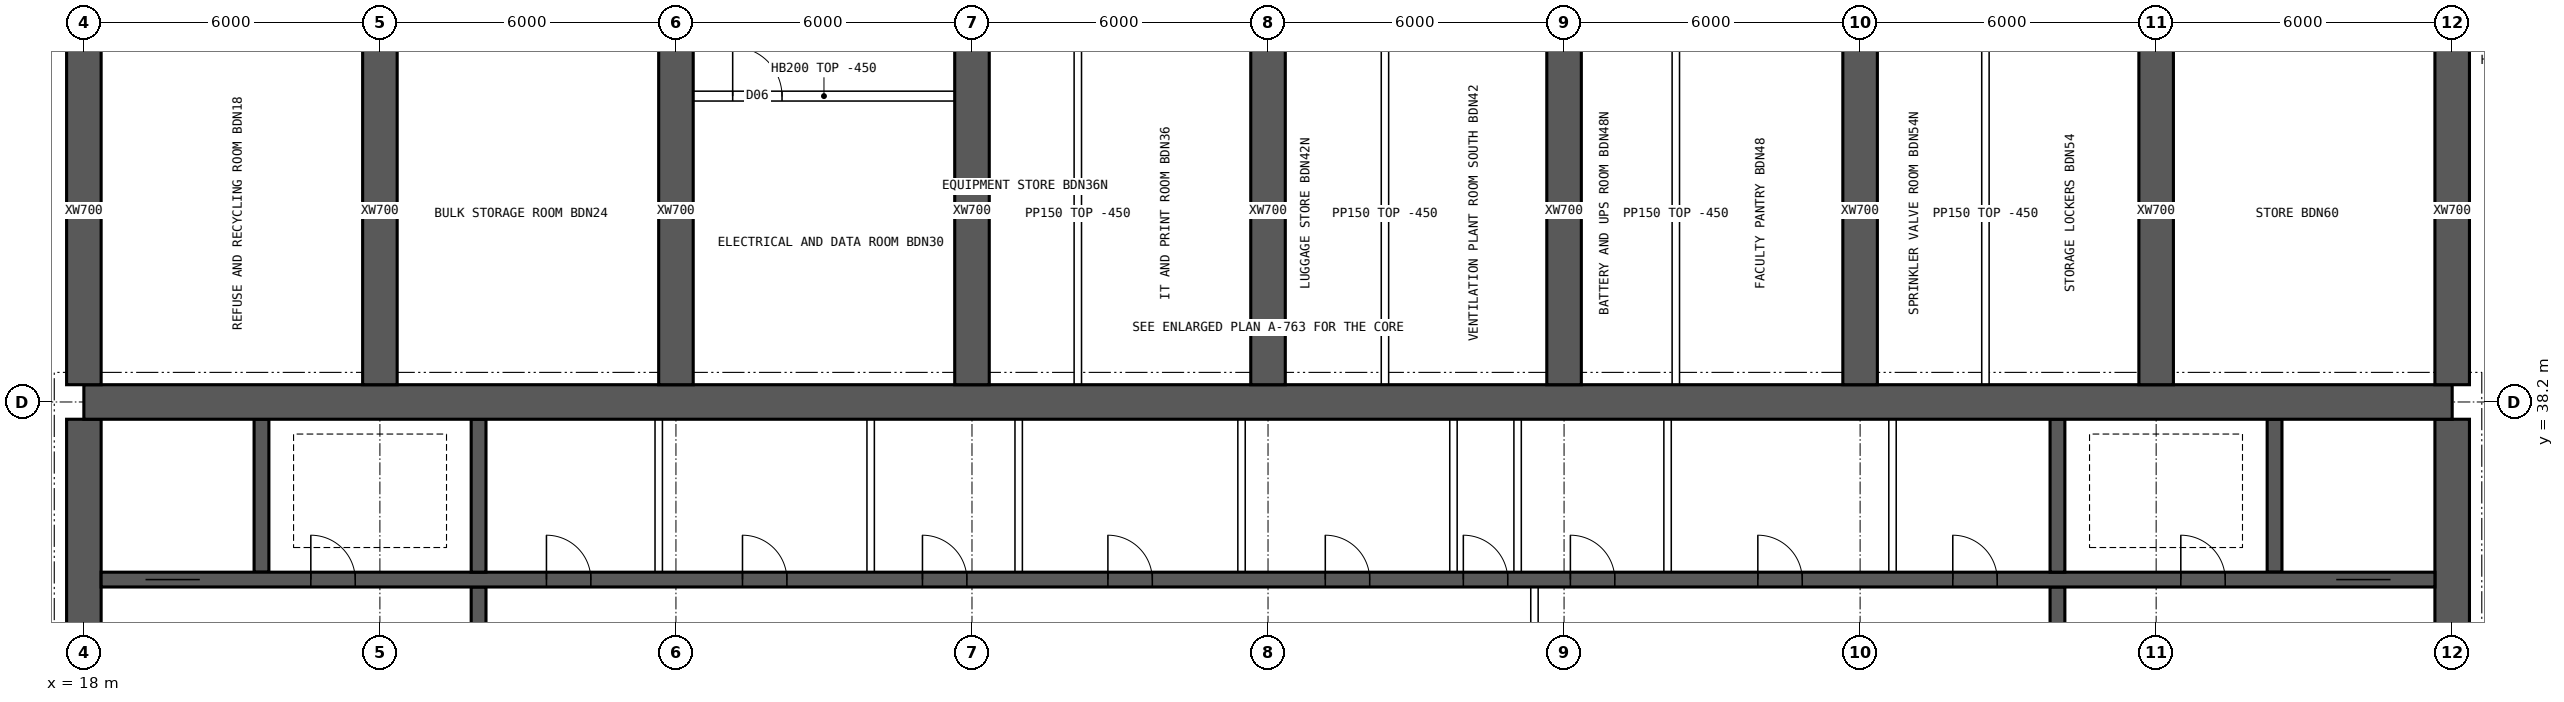
"""IFC4 building model, lengths in metres.
Left out: names, types, materials, properties, quantities, classifications, styles, units other than length and angle.
Written with IfcOpenShell. Run it as: python <this file> out.ifc"""

import sys

from ifc_helpers import new_model, si_unit, direction, frame, frame_2d, origin, place, context, subcontext, project, spatial, rectangle, extrude, element, fill, save


model = new_model("IFC4")
c1 = context("Model", 3, precision=1e-05, world=origin(), true_north=direction((0.0, 1.0)))
c2 = subcontext(c1, "Body", "Model", "MODEL_VIEW")
j1 = project(units=[si_unit("LENGTHUNIT", "METRE"), si_unit("PLANEANGLEUNIT", "RADIAN")], contexts=[c1])
p1 = place(None, origin())
s1 = spatial("IfcSite", under=j1, at=p1, CompositionType="ELEMENT")
p2 = place(p1, origin())
s2 = spatial("IfcBuilding", under=s1, at=p2, CompositionType="ELEMENT")
p3 = place(p2, frame((0.0, 0.0, 242.8)))
s3 = spatial("IfcBuildingStorey", under=s2, at=p3, CompositionType="ELEMENT", Elevation=242.8)
p4 = place(p3, frame((18.0, 38.2, 0.0), z_axis=(0.0, 0.0, 1.0), x_axis=(1.0, 0.0, 0.0)))
e1 = element("IfcWall", 1, at=p4, inside=s3, PredefinedType="SHEAR", context=c2, shape_type="SweptSolid", body=[
    extrude(rectangle(XDim=48.0, YDim=0.7, at=frame_2d((24.0, 0.0))), origin(), (0.0, 0.0, 1.0), 3.75),
])
p5 = place(p3, frame((18.0, 26.15, 0.0), z_axis=(0.0, 0.0, 1.0), x_axis=(0.0, 1.0, 0.0)))
e2 = element("IfcWall", 2, at=p5, inside=s3, PredefinedType="SHEAR", context=c2, shape_type="SweptSolid", body=[
    extrude(rectangle(XDim=11.7, YDim=0.7, at=frame_2d((5.85, 0.0))), origin(), (0.0, 0.0, 1.0), 3.75),
])
p6 = place(p5, frame((5.15, 0.0, 0.0)))
e3 = element("IfcOpeningElement", 3, at=p6, cuts=e2, PredefinedType="OPENING", context=c2, shape_type="SweptSolid", body=[
    extrude(rectangle(XDim=1.2, YDim=2.1, at=frame_2d((0.6, 1.05))), frame((0.0, 0.36, 0.0), z_axis=(0.0, -1.0, 0.0), x_axis=(1.0, 0.0, 0.0)), (0.0, 0.0, 1.0), 0.72),
])
p7 = place(p3, frame((66.0, 26.15, 0.0), z_axis=(0.0, 0.0, 1.0), x_axis=(0.0, 1.0, 0.0)))
e4 = element("IfcWall", 4, at=p7, inside=s3, PredefinedType="SHEAR", context=c2, shape_type="SweptSolid", body=[
    extrude(rectangle(XDim=11.7, YDim=0.7, at=frame_2d((5.85, 0.0))), origin(), (0.0, 0.0, 1.0), 3.75),
])
p8 = place(p7, frame((5.15, 0.0, 0.0)))
e5 = element("IfcOpeningElement", 5, at=p8, cuts=e4, PredefinedType="OPENING", context=c2, shape_type="SweptSolid", body=[
    extrude(rectangle(XDim=1.2, YDim=2.1, at=frame_2d((0.6, 1.05))), frame((0.0, 0.36, 0.0), z_axis=(0.0, -1.0, 0.0), x_axis=(1.0, 0.0, 0.0)), (0.0, 0.0, 1.0), 0.72),
])
p9 = place(p3, frame((18.35, 34.6, 0.0), z_axis=(0.0, 0.0, 1.0), x_axis=(1.0, 0.0, 0.0)))
e6 = element("IfcWall", 6, at=p9, inside=s3, PredefinedType="SHEAR", context=c2, shape_type="SweptSolid", body=[
    extrude(rectangle(XDim=47.3, YDim=0.3, at=frame_2d((23.65, 0.0))), origin(), (0.0, 0.0, 1.0), 3.75),
])
p10 = place(p9, frame((0.9, 0.0, 0.0)))
e7 = element("IfcOpeningElement", 7, at=p10, cuts=e6, PredefinedType="OPENING", context=c2, shape_type="SweptSolid", body=[
    extrude(rectangle(XDim=1.1, YDim=2.1, at=frame_2d((0.55, 1.05))), frame((0.0, 0.16, 0.0), z_axis=(0.0, -1.0, 0.0), x_axis=(1.0, 0.0, 0.0)), (0.0, 0.0, 1.0), 0.32),
])
p11 = place(p9, frame((45.3, 0.0, 0.0)))
e8 = element("IfcOpeningElement", 8, at=p11, cuts=e6, PredefinedType="OPENING", context=c2, shape_type="SweptSolid", body=[
    extrude(rectangle(XDim=1.1, YDim=2.1, at=frame_2d((0.55, 1.05))), frame((0.0, 0.16, 0.0), z_axis=(0.0, -1.0, 0.0), x_axis=(1.0, 0.0, 0.0)), (0.0, 0.0, 1.0), 0.32),
])
p12 = place(p9, frame((4.25, 0.0, 0.0)))
e9 = element("IfcOpeningElement", 9, at=p12, cuts=e6, PredefinedType="OPENING", context=c2, shape_type="SweptSolid", body=[
    extrude(rectangle(XDim=0.9, YDim=2.1, at=frame_2d((0.45, 1.05))), frame((0.0, 0.16, 0.0), z_axis=(0.0, -1.0, 0.0), x_axis=(1.0, 0.0, 0.0)), (0.0, 0.0, 1.0), 0.32),
])
p13 = place(p9, frame((42.15, 0.0, 0.0)))
e10 = element("IfcOpeningElement", 10, at=p13, cuts=e6, PredefinedType="OPENING", context=c2, shape_type="SweptSolid", body=[
    extrude(rectangle(XDim=0.9, YDim=2.1, at=frame_2d((0.45, 1.05))), frame((0.0, 0.16, 0.0), z_axis=(0.0, -1.0, 0.0), x_axis=(1.0, 0.0, 0.0)), (0.0, 0.0, 1.0), 0.32),
])
p14 = place(p9, frame((9.025, 0.0, 0.0)))
e11 = element("IfcOpeningElement", 11, at=p14, cuts=e6, PredefinedType="OPENING", context=c2, shape_type="SweptSolid", body=[
    extrude(rectangle(XDim=0.9, YDim=2.1, at=frame_2d((0.45, 1.05))), frame((0.0, 0.16, 0.0), z_axis=(0.0, -1.0, 0.0), x_axis=(1.0, 0.0, 0.0)), (0.0, 0.0, 1.0), 0.32),
])
p15 = place(p9, frame((12.999, 0.0, 0.0)))
e12 = element("IfcOpeningElement", 12, at=p15, cuts=e6, PredefinedType="OPENING", context=c2, shape_type="SweptSolid", body=[
    extrude(rectangle(XDim=0.9, YDim=2.1, at=frame_2d((0.45, 1.05))), frame((0.0, 0.16, 0.0), z_axis=(0.0, -1.0, 0.0), x_axis=(1.0, 0.0, 0.0)), (0.0, 0.0, 1.0), 0.32),
])
p16 = place(p9, frame((16.646, 0.0, 0.0)))
e13 = element("IfcOpeningElement", 13, at=p16, cuts=e6, PredefinedType="OPENING", context=c2, shape_type="SweptSolid", body=[
    extrude(rectangle(XDim=0.9, YDim=2.1, at=frame_2d((0.45, 1.05))), frame((0.0, 0.16, 0.0), z_axis=(0.0, -1.0, 0.0), x_axis=(1.0, 0.0, 0.0)), (0.0, 0.0, 1.0), 0.32),
])
p17 = place(p9, frame((20.405, 0.0, 0.0)))
e14 = element("IfcOpeningElement", 14, at=p17, cuts=e6, PredefinedType="OPENING", context=c2, shape_type="SweptSolid", body=[
    extrude(rectangle(XDim=0.9, YDim=2.1, at=frame_2d((0.45, 1.05))), frame((0.0, 0.16, 0.0), z_axis=(0.0, -1.0, 0.0), x_axis=(1.0, 0.0, 0.0)), (0.0, 0.0, 1.0), 0.32),
])
p18 = place(p9, frame((24.811, 0.0, 0.0)))
e15 = element("IfcOpeningElement", 15, at=p18, cuts=e6, PredefinedType="OPENING", context=c2, shape_type="SweptSolid", body=[
    extrude(rectangle(XDim=0.9, YDim=2.1, at=frame_2d((0.45, 1.05))), frame((0.0, 0.16, 0.0), z_axis=(0.0, -1.0, 0.0), x_axis=(1.0, 0.0, 0.0)), (0.0, 0.0, 1.0), 0.32),
])
p19 = place(p9, frame((27.608, 0.0, 0.0)))
e16 = element("IfcOpeningElement", 16, at=p19, cuts=e6, PredefinedType="OPENING", context=c2, shape_type="SweptSolid", body=[
    extrude(rectangle(XDim=0.9, YDim=2.1, at=frame_2d((0.45, 1.05))), frame((0.0, 0.16, 0.0), z_axis=(0.0, -1.0, 0.0), x_axis=(1.0, 0.0, 0.0)), (0.0, 0.0, 1.0), 0.32),
])
p20 = place(p9, frame((29.778, 0.0, 0.0)))
e17 = element("IfcOpeningElement", 17, at=p20, cuts=e6, PredefinedType="OPENING", context=c2, shape_type="SweptSolid", body=[
    extrude(rectangle(XDim=0.9, YDim=2.1, at=frame_2d((0.45, 1.05))), frame((0.0, 0.16, 0.0), z_axis=(0.0, -1.0, 0.0), x_axis=(1.0, 0.0, 0.0)), (0.0, 0.0, 1.0), 0.32),
])
p21 = place(p9, frame((33.577, 0.0, 0.0)))
e18 = element("IfcOpeningElement", 18, at=p21, cuts=e6, PredefinedType="OPENING", context=c2, shape_type="SweptSolid", body=[
    extrude(rectangle(XDim=0.9, YDim=2.1, at=frame_2d((0.45, 1.05))), frame((0.0, 0.16, 0.0), z_axis=(0.0, -1.0, 0.0), x_axis=(1.0, 0.0, 0.0)), (0.0, 0.0, 1.0), 0.32),
])
p22 = place(p9, frame((37.528, 0.0, 0.0)))
e19 = element("IfcOpeningElement", 19, at=p22, cuts=e6, PredefinedType="OPENING", context=c2, shape_type="SweptSolid", body=[
    extrude(rectangle(XDim=0.9, YDim=2.1, at=frame_2d((0.45, 1.05))), frame((0.0, 0.16, 0.0), z_axis=(0.0, -1.0, 0.0), x_axis=(1.0, 0.0, 0.0)), (0.0, 0.0, 1.0), 0.32),
])
p23 = place(p3, frame((26.0, 30.55, 0.0), z_axis=(0.0, 0.0, 1.0), x_axis=(0.0, 1.0, 0.0)))
e20 = element("IfcWall", 20, at=p23, inside=s3, PredefinedType="SHEAR", context=c2, shape_type="SweptSolid", body=[
    extrude(rectangle(XDim=3.9, YDim=0.3, at=frame_2d((1.95, 0.0))), origin(), (0.0, 0.0, 1.0), 3.75),
])
p24 = place(p23, frame((1.4, 0.0, 0.0)))
e21 = element("IfcOpeningElement", 21, at=p24, cuts=e20, PredefinedType="OPENING", context=c2, shape_type="SweptSolid", body=[
    extrude(rectangle(XDim=1.2, YDim=2.1, at=frame_2d((0.6, 1.05))), frame((0.0, 0.16, 0.0), z_axis=(0.0, -1.0, 0.0), x_axis=(1.0, 0.0, 0.0)), (0.0, 0.0, 1.0), 0.32),
])
p25 = place(p3, frame((58.0, 30.55, 0.0), z_axis=(0.0, 0.0, 1.0), x_axis=(0.0, 1.0, 0.0)))
e22 = element("IfcWall", 22, at=p25, inside=s3, PredefinedType="SHEAR", context=c2, shape_type="SweptSolid", body=[
    extrude(rectangle(XDim=3.9, YDim=0.3, at=frame_2d((1.95, 0.0))), origin(), (0.0, 0.0, 1.0), 3.75),
])
p26 = place(p25, frame((1.4, 0.0, 0.0)))
e23 = element("IfcOpeningElement", 23, at=p26, cuts=e22, PredefinedType="OPENING", context=c2, shape_type="SweptSolid", body=[
    extrude(rectangle(XDim=1.2, YDim=2.1, at=frame_2d((0.6, 1.05))), frame((0.0, 0.16, 0.0), z_axis=(0.0, -1.0, 0.0), x_axis=(1.0, 0.0, 0.0)), (0.0, 0.0, 1.0), 0.32),
])
for number, where, z_axis, x_axis in (
    (24, (21.6, 34.75, 0.0), (0.0, 0.0, 1.0), (0.0, 1.0, 0.0)),
    (25, (62.4, 34.75, 0.0), (0.0, 0.0, 1.0), (0.0, 1.0, 0.0)),
    (26, (26.0, 34.75, 0.0), (0.0, 0.0, 1.0), (0.0, 1.0, 0.0)),
    (27, (58.0, 34.75, 0.0), (0.0, 0.0, 1.0), (0.0, 1.0, 0.0)),
):
    element("IfcWall", number, at=place(p3, frame(where, z_axis=z_axis, x_axis=x_axis)), inside=s3, PredefinedType="SHEAR", context=c2, shape_type="SweptSolid", body=[
        extrude(rectangle(XDim=3.1, YDim=0.3, at=frame_2d((1.55, 0.0))), origin(), (0.0, 0.0, 1.0), 3.75),
    ])
for number, where, z_axis, x_axis in (
    (28, (18.0, 38.55, 0.0), (0.0, 0.0, 1.0), (0.0, 1.0, 0.0)),
    (29, (24.0, 38.55, 0.0), (0.0, 0.0, 1.0), (0.0, 1.0, 0.0)),
    (30, (30.0, 38.55, 0.0), (0.0, 0.0, 1.0), (0.0, 1.0, 0.0)),
    (31, (36.0, 38.55, 0.0), (0.0, 0.0, 1.0), (0.0, 1.0, 0.0)),
    (32, (42.0, 38.55, 0.0), (0.0, 0.0, 1.0), (0.0, 1.0, 0.0)),
    (33, (48.0, 38.55, 0.0), (0.0, 0.0, 1.0), (0.0, 1.0, 0.0)),
    (34, (54.0, 38.55, 0.0), (0.0, 0.0, 1.0), (0.0, 1.0, 0.0)),
    (35, (60.0, 38.55, 0.0), (0.0, 0.0, 1.0), (0.0, 1.0, 0.0)),
    (36, (66.0, 38.55, 0.0), (0.0, 0.0, 1.0), (0.0, 1.0, 0.0)),
):
    element("IfcWall", number, at=place(p3, frame(where, z_axis=z_axis, x_axis=x_axis)), inside=s3, PredefinedType="SHEAR", context=c2, shape_type="SweptSolid", body=[
        extrude(rectangle(XDim=7.05, YDim=0.7, at=frame_2d((3.525, 0.0))), origin(), (0.0, 0.0, 1.0), 3.75),
    ])
p27 = place(p3, frame((47.4, 30.55, 0.0), z_axis=(0.0, 0.0, 1.0), x_axis=(0.0, 1.0, 0.0)))
e37 = element("IfcWall", 37, at=p27, inside=s3, PredefinedType="SOLIDWALL", context=c2, shape_type="SweptSolid", body=[
    extrude(rectangle(XDim=3.9, YDim=0.15, at=frame_2d((1.95, 0.0))), origin(), (0.0, 0.0, 1.0), 3.3),
])
p28 = place(p27, frame((1.15, 0.0, 0.0)))
e38 = element("IfcOpeningElement", 38, at=p28, cuts=e37, PredefinedType="OPENING", context=c2, shape_type="SweptSolid", body=[
    extrude(rectangle(XDim=1.6, YDim=2.1, at=frame_2d((0.8, 1.05))), frame((0.0, 0.085, 0.0), z_axis=(0.0, -1.0, 0.0), x_axis=(1.0, 0.0, 0.0)), (0.0, 0.0, 1.0), 0.17),
])
for number, where, z_axis, x_axis in (
    (39, (29.651, 34.75, 0.0), (0.0, 0.0, 1.0), (0.0, 1.0, 0.0)),
    (40, (33.946, 34.75, 0.0), (0.0, 0.0, 1.0), (0.0, 1.0, 0.0)),
    (41, (36.946, 34.75, 0.0), (0.0, 0.0, 1.0), (0.0, 1.0, 0.0)),
    (42, (41.463, 34.75, 0.0), (0.0, 0.0, 1.0), (0.0, 1.0, 0.0)),
    (43, (45.758, 34.75, 0.0), (0.0, 0.0, 1.0), (0.0, 1.0, 0.0)),
    (44, (47.058, 34.75, 0.0), (0.0, 0.0, 1.0), (0.0, 1.0, 0.0)),
    (45, (50.098, 34.75, 0.0), (0.0, 0.0, 1.0), (0.0, 1.0, 0.0)),
    (46, (54.657, 34.75, 0.0), (0.0, 0.0, 1.0), (0.0, 1.0, 0.0)),
):
    element("IfcWall", number, at=place(p3, frame(where, z_axis=z_axis, x_axis=x_axis)), inside=s3, PredefinedType="SOLIDWALL", context=c2, shape_type="SweptSolid", body=[
        extrude(rectangle(XDim=3.1, YDim=0.15, at=frame_2d((1.55, 0.0))), origin(), (0.0, 0.0, 1.0), 3.3),
    ])
p29 = place(p3, frame((30.35, 44.4, 0.0), z_axis=(0.0, 0.0, 1.0), x_axis=(1.0, 0.0, 0.0)))
e47 = element("IfcWall", 47, at=p29, inside=s3, PredefinedType="SOLIDWALL", context=c2, shape_type="SweptSolid", body=[
    extrude(rectangle(XDim=5.3, YDim=0.2, at=frame_2d((2.65, 0.0))), origin(), (0.0, 0.0, 1.0), 3.3),
])
p30 = place(p29, frame((0.8, 0.0, 0.0)))
e48 = element("IfcOpeningElement", 48, at=p30, cuts=e47, PredefinedType="OPENING", context=c2, shape_type="SweptSolid", body=[
    extrude(rectangle(XDim=1.0, YDim=2.1, at=frame_2d((0.5, 1.05))), frame((0.0, 0.11, 0.0), z_axis=(0.0, -1.0, 0.0), x_axis=(1.0, 0.0, 0.0)), (0.0, 0.0, 1.0), 0.22),
])
for number, where, z_axis, x_axis in (
    (49, (38.145, 38.55, 0.0), (0.0, 0.0, 1.0), (0.0, 1.0, 0.0)),
    (50, (44.37, 38.55, 0.0), (0.0, 0.0, 1.0), (0.0, 1.0, 0.0)),
    (51, (50.265, 38.55, 0.0), (0.0, 0.0, 1.0), (0.0, 1.0, 0.0)),
    (52, (56.54, 38.55, 0.0), (0.0, 0.0, 1.0), (0.0, 1.0, 0.0)),
):
    element("IfcWall", number, at=place(p3, frame(where, z_axis=z_axis, x_axis=x_axis)), inside=s3, PredefinedType="PARTITIONING", context=c2, shape_type="SweptSolid", body=[
        extrude(rectangle(XDim=6.95, YDim=0.15, at=frame_2d((3.475, 0.0))), origin(), (0.0, 0.0, 1.0), 3.3),
    ])
p31 = place(p10, origin())
e53 = element("IfcDoor", 53, at=p31, inside=s3, OperationType="DOUBLE_DOOR_SLIDING", PredefinedType="DOOR", context=c2, shape_type="SweptSolid", body=[
    extrude(rectangle(XDim=1.1, YDim=2.1, at=frame_2d((0.55, 1.05))), frame((0.0, 0.025, 0.0), z_axis=(0.0, -1.0, 0.0), x_axis=(1.0, 0.0, 0.0)), (0.0, 0.0, 1.0), 0.05),
])
fill(e7, e53)
p32 = place(p11, origin())
e54 = element("IfcDoor", 54, at=p32, inside=s3, OperationType="DOUBLE_DOOR_SLIDING", PredefinedType="DOOR", context=c2, shape_type="SweptSolid", body=[
    extrude(rectangle(XDim=1.1, YDim=2.1, at=frame_2d((0.55, 1.05))), frame((0.0, 0.025, 0.0), z_axis=(0.0, -1.0, 0.0), x_axis=(1.0, 0.0, 0.0)), (0.0, 0.0, 1.0), 0.05),
])
fill(e8, e54)
p33 = place(p12, origin())
e55 = element("IfcDoor", 55, at=p33, inside=s3, OperationType="SINGLE_SWING_LEFT", PredefinedType="DOOR", context=c2, shape_type="SweptSolid", body=[
    extrude(rectangle(XDim=0.9, YDim=2.1, at=frame_2d((0.45, 1.05))), frame((0.0, 0.025, 0.0), z_axis=(0.0, -1.0, 0.0), x_axis=(1.0, 0.0, 0.0)), (0.0, 0.0, 1.0), 0.05),
])
fill(e9, e55)
p34 = place(p13, origin())
e56 = element("IfcDoor", 56, at=p34, inside=s3, OperationType="SINGLE_SWING_LEFT", PredefinedType="DOOR", context=c2, shape_type="SweptSolid", body=[
    extrude(rectangle(XDim=0.9, YDim=2.1, at=frame_2d((0.45, 1.05))), frame((0.0, 0.025, 0.0), z_axis=(0.0, -1.0, 0.0), x_axis=(1.0, 0.0, 0.0)), (0.0, 0.0, 1.0), 0.05),
])
fill(e10, e56)
p35 = place(p14, origin())
e57 = element("IfcDoor", 57, at=p35, inside=s3, OperationType="SINGLE_SWING_LEFT", PredefinedType="DOOR", context=c2, shape_type="SweptSolid", body=[
    extrude(rectangle(XDim=0.9, YDim=2.1, at=frame_2d((0.45, 1.05))), frame((0.0, 0.025, 0.0), z_axis=(0.0, -1.0, 0.0), x_axis=(1.0, 0.0, 0.0)), (0.0, 0.0, 1.0), 0.05),
])
fill(e11, e57)
p36 = place(p15, origin())
e58 = element("IfcDoor", 58, at=p36, inside=s3, OperationType="SINGLE_SWING_LEFT", PredefinedType="DOOR", context=c2, shape_type="SweptSolid", body=[
    extrude(rectangle(XDim=0.9, YDim=2.1, at=frame_2d((0.45, 1.05))), frame((0.0, 0.025, 0.0), z_axis=(0.0, -1.0, 0.0), x_axis=(1.0, 0.0, 0.0)), (0.0, 0.0, 1.0), 0.05),
])
fill(e12, e58)
p37 = place(p16, origin())
e59 = element("IfcDoor", 59, at=p37, inside=s3, OperationType="SINGLE_SWING_LEFT", PredefinedType="DOOR", context=c2, shape_type="SweptSolid", body=[
    extrude(rectangle(XDim=0.9, YDim=2.1, at=frame_2d((0.45, 1.05))), frame((0.0, 0.025, 0.0), z_axis=(0.0, -1.0, 0.0), x_axis=(1.0, 0.0, 0.0)), (0.0, 0.0, 1.0), 0.05),
])
fill(e13, e59)
p38 = place(p17, origin())
e60 = element("IfcDoor", 60, at=p38, inside=s3, OperationType="SINGLE_SWING_LEFT", PredefinedType="DOOR", context=c2, shape_type="SweptSolid", body=[
    extrude(rectangle(XDim=0.9, YDim=2.1, at=frame_2d((0.45, 1.05))), frame((0.0, 0.025, 0.0), z_axis=(0.0, -1.0, 0.0), x_axis=(1.0, 0.0, 0.0)), (0.0, 0.0, 1.0), 0.05),
])
fill(e14, e60)
p39 = place(p18, origin())
e61 = element("IfcDoor", 61, at=p39, inside=s3, OperationType="SINGLE_SWING_LEFT", PredefinedType="DOOR", context=c2, shape_type="SweptSolid", body=[
    extrude(rectangle(XDim=0.9, YDim=2.1, at=frame_2d((0.45, 1.05))), frame((0.0, 0.025, 0.0), z_axis=(0.0, -1.0, 0.0), x_axis=(1.0, 0.0, 0.0)), (0.0, 0.0, 1.0), 0.05),
])
fill(e15, e61)
p40 = place(p19, origin())
e62 = element("IfcDoor", 62, at=p40, inside=s3, OperationType="SINGLE_SWING_LEFT", PredefinedType="DOOR", context=c2, shape_type="SweptSolid", body=[
    extrude(rectangle(XDim=0.9, YDim=2.1, at=frame_2d((0.45, 1.05))), frame((0.0, 0.025, 0.0), z_axis=(0.0, -1.0, 0.0), x_axis=(1.0, 0.0, 0.0)), (0.0, 0.0, 1.0), 0.05),
])
fill(e16, e62)
p41 = place(p20, origin())
e63 = element("IfcDoor", 63, at=p41, inside=s3, OperationType="SINGLE_SWING_LEFT", PredefinedType="DOOR", context=c2, shape_type="SweptSolid", body=[
    extrude(rectangle(XDim=0.9, YDim=2.1, at=frame_2d((0.45, 1.05))), frame((0.0, 0.025, 0.0), z_axis=(0.0, -1.0, 0.0), x_axis=(1.0, 0.0, 0.0)), (0.0, 0.0, 1.0), 0.05),
])
fill(e17, e63)
p42 = place(p21, origin())
e64 = element("IfcDoor", 64, at=p42, inside=s3, OperationType="SINGLE_SWING_LEFT", PredefinedType="DOOR", context=c2, shape_type="SweptSolid", body=[
    extrude(rectangle(XDim=0.9, YDim=2.1, at=frame_2d((0.45, 1.05))), frame((0.0, 0.025, 0.0), z_axis=(0.0, -1.0, 0.0), x_axis=(1.0, 0.0, 0.0)), (0.0, 0.0, 1.0), 0.05),
])
fill(e18, e64)
p43 = place(p22, origin())
e65 = element("IfcDoor", 65, at=p43, inside=s3, OperationType="SINGLE_SWING_LEFT", PredefinedType="DOOR", context=c2, shape_type="SweptSolid", body=[
    extrude(rectangle(XDim=0.9, YDim=2.1, at=frame_2d((0.45, 1.05))), frame((0.0, 0.025, 0.0), z_axis=(0.0, -1.0, 0.0), x_axis=(1.0, 0.0, 0.0)), (0.0, 0.0, 1.0), 0.05),
])
fill(e19, e65)
p44 = place(p30, origin())
e66 = element("IfcDoor", 66, at=p44, inside=s3, OperationType="SINGLE_SWING_LEFT", PredefinedType="DOOR", context=c2, shape_type="SweptSolid", body=[
    extrude(rectangle(XDim=1.0, YDim=2.1, at=frame_2d((0.5, 1.05))), frame((0.0, 0.025, 0.0), z_axis=(0.0, -1.0, 0.0), x_axis=(1.0, 0.0, 0.0)), (0.0, 0.0, 1.0), 0.05),
])
fill(e48, e66)
save(model, sys.argv[1])
